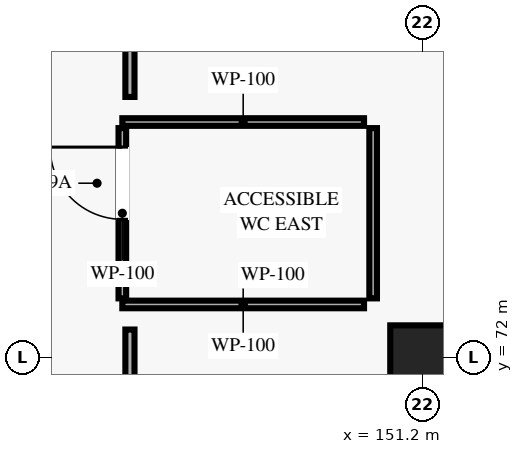
"""IFC4 building model, lengths in metres.
Left out: names, types, materials, properties, quantities, classifications, styles, units other than length and angle.
Written with IfcOpenShell. Run it as: python <this file> out.ifc"""

import sys

from ifc_helpers import new_model, si_unit, direction, frame, frame_2d, origin, origin_2d, place, context, subcontext, project, spatial, rectangle, extrude, element, fill, save


model = new_model("IFC4")
c1 = context("Model", 3, precision=1e-05, world=origin(), true_north=direction((0.0, 1.0)))
c2 = subcontext(c1, "Body", "Model", "MODEL_VIEW")
j1 = project(units=[si_unit("LENGTHUNIT", "METRE"), si_unit("PLANEANGLEUNIT", "RADIAN")], contexts=[c1])
p1 = place(None, origin())
s1 = spatial("IfcSite", under=j1, at=p1, CompositionType="ELEMENT")
p2 = place(p1, origin())
s2 = spatial("IfcBuilding", under=s1, at=p2, CompositionType="ELEMENT")
p3 = place(p2, origin())
s3 = spatial("IfcBuildingStorey", under=s2, at=p3, CompositionType="ELEMENT", Elevation=0.0)
p4 = place(p3, frame((151.2, 72.0, 0.0), z_axis=(0.0, 0.0, 1.0), x_axis=(1.0, 0.0, 0.0)))
e1 = element("IfcColumn", 1, at=p4, inside=s3, PredefinedType="COLUMN", context=c2, shape_type="SweptSolid", body=[
    extrude(rectangle(XDim=0.85, YDim=0.85, at=origin_2d()), origin(), (0.0, 0.0, 1.0), 5.4),
])
p5 = place(p3, frame((147.25, 72.78, 0.0), z_axis=(0.0, 0.0, 1.0), x_axis=(0.0, 1.0, 0.0)))
e2 = element("IfcWall", 2, at=p5, inside=s3, PredefinedType="PARTITIONING", context=c2, shape_type="SweptSolid", body=[
    extrude(rectangle(XDim=2.24, YDim=0.1, at=frame_2d((1.12, 0.0))), origin(), (0.0, 0.0, 1.0), 5.16),
])
p6 = place(p5, frame((1.04, 0.0, 0.0)))
e3 = element("IfcOpeningElement", 3, at=p6, cuts=e2, PredefinedType="OPENING", context=c2, shape_type="SweptSolid", body=[
    extrude(rectangle(XDim=0.95, YDim=2.1, at=frame_2d((0.475, 1.05))), frame((0.0, 0.06, 0.0), z_axis=(0.0, -1.0, 0.0), x_axis=(1.0, 0.0, 0.0)), (0.0, 0.0, 1.0), 0.12),
])
for number, where, z_axis, x_axis in (
    (4, (147.25, 72.7, 0.0), (0.0, 0.0, 1.0), (1.0, 0.0, 0.0)),
    (5, (147.25, 75.1, 0.0), (0.0, 0.0, 1.0), (1.0, 0.0, 0.0)),
):
    element("IfcWall", number, at=place(p3, frame(where, z_axis=z_axis, x_axis=x_axis)), inside=s3, PredefinedType="PARTITIONING", context=c2, shape_type="SweptSolid", body=[
        extrude(rectangle(XDim=3.18, YDim=0.1, at=frame_2d((1.59, 0.0))), origin(), (0.0, 0.0, 1.0), 5.16),
    ])
p7 = place(p3, frame((150.55, 72.78, 0.0), z_axis=(0.0, 0.0, 1.0), x_axis=(0.0, 1.0, 0.0)))
e6 = element("IfcWall", 6, at=p7, inside=s3, PredefinedType="PARTITIONING", context=c2, shape_type="SweptSolid", body=[
    extrude(rectangle(XDim=2.24, YDim=0.1, at=frame_2d((1.12, 0.0))), origin(), (0.0, 0.0, 1.0), 5.16),
])
p8 = place(p3, frame((147.35, 57.15, 0.0), z_axis=(0.0, 0.0, 1.0), x_axis=(0.0, 1.0, 0.0)))
e7 = element("IfcWall", 7, at=p8, inside=s3, PredefinedType="PARTITIONING", context=c2, shape_type="SweptSolid", body=[
    extrude(rectangle(XDim=15.22, YDim=0.12, at=frame_2d((7.61, 0.0))), origin(), (0.0, 0.0, 1.0), 5.16),
])
p9 = place(p8, frame((3.255, 0.0, 0.0)))
e8 = element("IfcOpeningElement", 8, at=p9, cuts=e7, PredefinedType="OPENING", context=c2, shape_type="SweptSolid", body=[
    extrude(rectangle(XDim=1.7, YDim=2.2, at=frame_2d((0.85, 1.1))), frame((0.0, 0.07, 0.0), z_axis=(0.0, -1.0, 0.0), x_axis=(1.0, 0.0, 0.0)), (0.0, 0.0, 1.0), 0.14),
])
p10 = place(p3, frame((147.35, 75.43, 0.0), z_axis=(0.0, 0.0, 1.0), x_axis=(0.0, 1.0, 0.0)))
e9 = element("IfcWall", 9, at=p10, inside=s3, PredefinedType="PARTITIONING", context=c2, shape_type="SweptSolid", body=[
    extrude(rectangle(XDim=13.07, YDim=0.12, at=frame_2d((6.535, 0.0))), origin(), (0.0, 0.0, 1.0), 5.16),
])
p11 = place(p6, origin())
e10 = element("IfcDoor", 10, at=p11, inside=s3, OperationType="SINGLE_SWING_RIGHT", PredefinedType="DOOR", context=c2, shape_type="SweptSolid", body=[
    extrude(rectangle(XDim=0.95, YDim=2.1, at=frame_2d((0.475, 1.05))), frame((0.0, 0.025, 0.0), z_axis=(0.0, -1.0, 0.0), x_axis=(1.0, 0.0, 0.0)), (0.0, 0.0, 1.0), 0.05),
])
fill(e3, e10)
save(model, sys.argv[1])
